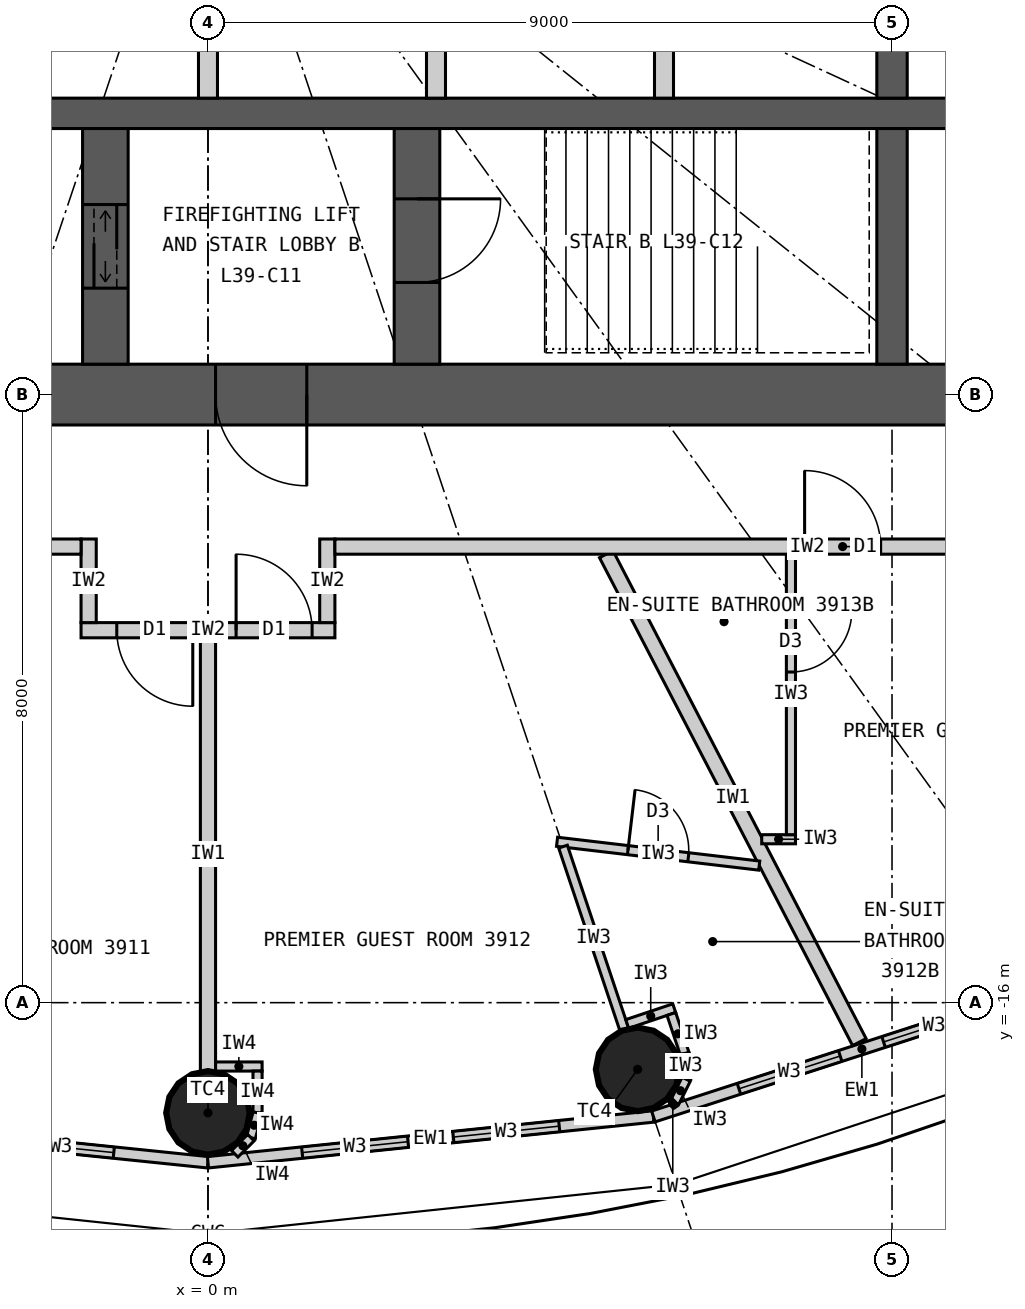
"""IFC4 building model, lengths in metres.
Left out: names, types, materials, properties, quantities, classifications, styles, units other than length and angle.
Written with IfcOpenShell. Run it as: python <this file> out.ifc"""

import sys

from ifc_helpers import new_model, si_unit, direction, frame, frame_2d, origin, origin_2d, place, context, subcontext, project, spatial, rectangle, circle, extrude, element, fill, save


model = new_model("IFC4")
c1 = context("Model", 3, precision=1e-05, world=origin(), true_north=direction((0.0, 1.0)))
c2 = subcontext(c1, "Body", "Model", "MODEL_VIEW")
j1 = project(units=[si_unit("LENGTHUNIT", "METRE"), si_unit("PLANEANGLEUNIT", "RADIAN")], contexts=[c1])
p1 = place(None, origin())
s1 = spatial("IfcSite", under=j1, at=p1, CompositionType="ELEMENT")
p2 = place(p1, origin())
s2 = spatial("IfcBuilding", under=s1, at=p2, CompositionType="ELEMENT")
p3 = place(p2, frame((0.0, 0.0, 150.0)))
s3 = spatial("IfcBuildingStorey", under=s2, at=p3, CompositionType="ELEMENT", Elevation=150.0)
for number, where, z_axis, x_axis in (
    (1, (0.0, -17.45, 0.0), (0.0, 0.0, 1.0), (1.0, 0.0, 0.0)),
    (2, (5.653, -16.877, 0.0), (0.0, 0.0, 1.0), (1.0, 0.0, 0.0)),
):
    element("IfcColumn", number, at=place(p3, frame(where, z_axis=z_axis, x_axis=x_axis)), inside=s3, PredefinedType="COLUMN", context=c2, shape_type="SweptSolid", body=[
        extrude(circle(Radius=0.55, at=origin_2d()), origin(), (0.0, 0.0, 1.0), 3.3),
    ])
p4 = place(p3, frame((12.4, -8.0, 0.0), z_axis=(0.0, 0.0, 1.0), x_axis=(-1.0, 0.0, 0.0)))
e3 = element("IfcWall", 3, at=p4, inside=s3, PredefinedType="SHEAR", context=c2, shape_type="SweptSolid", body=[
    extrude(rectangle(XDim=24.8, YDim=0.8, at=frame_2d((12.4, 0.0))), origin(), (0.0, 0.0, 1.0), 3.3),
])
p5 = place(p4, frame((11.1, 0.0, 0.0)))
e4 = element("IfcOpeningElement", 4, at=p5, cuts=e3, PredefinedType="OPENING", context=c2, shape_type="SweptSolid", body=[
    extrude(rectangle(XDim=1.2, YDim=2.2, at=frame_2d((0.6, 1.1))), frame((0.0, 0.41, 0.0), z_axis=(0.0, -1.0, 0.0), x_axis=(1.0, 0.0, 0.0)), (0.0, 0.0, 1.0), 0.82),
])
p6 = place(p4, frame((18.7, 0.0, 0.0)))
e5 = element("IfcOpeningElement", 5, at=p6, cuts=e3, PredefinedType="OPENING", context=c2, shape_type="SweptSolid", body=[
    extrude(rectangle(XDim=0.9, YDim=2.2, at=frame_2d((0.45, 1.1))), frame((0.0, 0.41, 0.0), z_axis=(0.0, -1.0, 0.0), x_axis=(1.0, 0.0, 0.0)), (0.0, 0.0, 1.0), 0.82),
])
p7 = place(p3, frame((-11.6, -4.3, 0.0), z_axis=(0.0, 0.0, 1.0), x_axis=(1.0, 0.0, 0.0)))
e6 = element("IfcWall", 6, at=p7, inside=s3, PredefinedType="SHEAR", context=c2, shape_type="SweptSolid", body=[
    extrude(rectangle(XDim=23.2, YDim=0.4, at=frame_2d((11.6, 0.0))), origin(), (0.0, 0.0, 1.0), 3.3),
])
p8 = place(p3, frame((9.0, -4.1, 0.0), z_axis=(0.0, 0.0, 1.0), x_axis=(0.0, 1.0, 0.0)))
e7 = element("IfcWall", 7, at=p8, inside=s3, PredefinedType="SHEAR", context=c2, shape_type="SweptSolid", body=[
    extrude(rectangle(XDim=2.35, YDim=0.4, at=frame_2d((1.175, 0.0))), origin(), (0.0, 0.0, 1.0), 3.3),
])
p9 = place(p3, frame((9.0, -7.6, 0.0), z_axis=(0.0, 0.0, 1.0), x_axis=(0.0, 1.0, 0.0)))
e8 = element("IfcWall", 8, at=p9, inside=s3, PredefinedType="SHEAR", context=c2, shape_type="SweptSolid", body=[
    extrude(rectangle(XDim=3.1, YDim=0.4, at=frame_2d((1.55, 0.0))), origin(), (0.0, 0.0, 1.0), 3.3),
])
p10 = place(p3, frame((2.75, -7.6, 0.0), z_axis=(0.0, 0.0, 1.0), x_axis=(0.0, 1.0, 0.0)))
e9 = element("IfcWall", 9, at=p10, inside=s3, PredefinedType="SHEAR", context=c2, shape_type="SweptSolid", body=[
    extrude(rectangle(XDim=3.1, YDim=0.6, at=frame_2d((1.55, 0.0))), origin(), (0.0, 0.0, 1.0), 3.3),
])
p11 = place(p10, frame((1.075, 0.0, 0.0)))
e10 = element("IfcOpeningElement", 10, at=p11, cuts=e9, PredefinedType="OPENING", context=c2, shape_type="SweptSolid", body=[
    extrude(rectangle(XDim=1.1, YDim=2.2, at=frame_2d((0.55, 1.1))), frame((0.0, 0.31, 0.0), z_axis=(0.0, -1.0, 0.0), x_axis=(1.0, 0.0, 0.0)), (0.0, 0.0, 1.0), 0.62),
])
p12 = place(p3, frame((-1.35, -7.6, 0.0), z_axis=(0.0, 0.0, 1.0), x_axis=(0.0, 1.0, 0.0)))
e11 = element("IfcWall", 11, at=p12, inside=s3, PredefinedType="SHEAR", context=c2, shape_type="SweptSolid", body=[
    extrude(rectangle(XDim=3.1, YDim=0.6, at=frame_2d((1.55, 0.0))), origin(), (0.0, 0.0, 1.0), 3.3),
])
p13 = place(p12, frame((1.0, 0.0, 0.0)))
e12 = element("IfcOpeningElement", 12, at=p13, cuts=e11, PredefinedType="OPENING", context=c2, shape_type="SweptSolid", body=[
    extrude(rectangle(XDim=1.1, YDim=2.2, at=frame_2d((0.55, 1.1))), frame((0.0, 0.31, 0.0), z_axis=(0.0, -1.0, 0.0), x_axis=(1.0, 0.0, 0.0)), (0.0, 0.0, 1.0), 0.62),
])
for number, where, z_axis, x_axis in (
    (13, (0.0, -4.1, 0.0), (0.0, 0.0, 1.0), (0.0, 1.0, 0.0)),
    (14, (3.0, -4.1, 0.0), (0.0, 0.0, 1.0), (0.0, 1.0, 0.0)),
    (15, (6.0, -4.1, 0.0), (0.0, 0.0, 1.0), (0.0, 1.0, 0.0)),
):
    element("IfcWall", number, at=place(p3, frame(where, z_axis=z_axis, x_axis=x_axis)), inside=s3, PredefinedType="PARTITIONING", context=c2, shape_type="SweptSolid", body=[
        extrude(rectangle(XDim=2.35, YDim=0.25, at=frame_2d((1.175, 0.0))), origin(), (0.0, 0.0, 1.0), 3.3),
    ])
p14 = place(p3, frame((-5.86, -17.497, 0.0), z_axis=(0.0, 0.0, 1.0), x_axis=(0.994751738032, -0.102318032045, 0.0)))
e16 = element("IfcWall", 16, at=p14, inside=s3, PredefinedType="ELEMENTEDWALL", context=c2, shape_type="SweptSolid", body=[
    extrude(rectangle(XDim=5.891, YDim=0.15, at=frame_2d((2.946, 0.0))), origin(), (0.0, 0.0, 1.0), 3.12),
])
p15 = place(p14, frame((1.246, 0.0, 0.9)))
e17 = element("IfcOpeningElement", 17, at=p15, cuts=e16, PredefinedType="OPENING", context=c2, shape_type="SweptSolid", body=[
    extrude(rectangle(XDim=1.4, YDim=1.9, at=frame_2d((0.7, 0.95))), frame((0.0, 0.085, 0.0), z_axis=(0.0, -1.0, 0.0), x_axis=(1.0, 0.0, 0.0)), (0.0, 0.0, 1.0), 0.17),
])
p16 = place(p14, frame((3.246, 0.0, 0.9)))
e18 = element("IfcOpeningElement", 18, at=p16, cuts=e16, PredefinedType="OPENING", context=c2, shape_type="SweptSolid", body=[
    extrude(rectangle(XDim=1.4, YDim=1.9, at=frame_2d((0.7, 0.95))), frame((0.0, 0.085, 0.0), z_axis=(0.0, -1.0, 0.0), x_axis=(1.0, 0.0, 0.0)), (0.0, 0.0, 1.0), 0.17),
])
p17 = place(p3, frame((0.0, -18.1, 0.0), z_axis=(0.0, 0.0, 1.0), x_axis=(0.994751738032, 0.102318032045, 0.0)))
e19 = element("IfcWall", 19, at=p17, inside=s3, PredefinedType="ELEMENTEDWALL", context=c2, shape_type="SweptSolid", body=[
    extrude(rectangle(XDim=5.891, YDim=0.15, at=frame_2d((2.946, 0.0))), origin(), (0.0, 0.0, 1.0), 3.12),
])
p18 = place(p17, frame((1.246, 0.0, 0.9)))
e20 = element("IfcOpeningElement", 20, at=p18, cuts=e19, PredefinedType="OPENING", context=c2, shape_type="SweptSolid", body=[
    extrude(rectangle(XDim=1.4, YDim=1.9, at=frame_2d((0.7, 0.95))), frame((0.0, 0.085, 0.0), z_axis=(0.0, -1.0, 0.0), x_axis=(1.0, 0.0, 0.0)), (0.0, 0.0, 1.0), 0.17),
])
p19 = place(p17, frame((3.246, 0.0, 0.9)))
e21 = element("IfcOpeningElement", 21, at=p19, cuts=e19, PredefinedType="OPENING", context=c2, shape_type="SweptSolid", body=[
    extrude(rectangle(XDim=1.4, YDim=1.9, at=frame_2d((0.7, 0.95))), frame((0.0, 0.085, 0.0), z_axis=(0.0, -1.0, 0.0), x_axis=(1.0, 0.0, 0.0)), (0.0, 0.0, 1.0), 0.17),
])
p20 = place(p3, frame((5.86, -17.497, 0.0), z_axis=(0.0, 0.0, 1.0), x_axis=(0.951432482129, 0.307857486429, 0.0)))
e22 = element("IfcWall", 22, at=p20, inside=s3, PredefinedType="ELEMENTEDWALL", context=c2, shape_type="SweptSolid", body=[
    extrude(rectangle(XDim=5.766, YDim=0.15, at=frame_2d((2.883, 0.0))), origin(), (0.0, 0.0, 1.0), 3.12),
])
p21 = place(p20, frame((1.183, 0.0, 0.9)))
e23 = element("IfcOpeningElement", 23, at=p21, cuts=e22, PredefinedType="OPENING", context=c2, shape_type="SweptSolid", body=[
    extrude(rectangle(XDim=1.4, YDim=1.9, at=frame_2d((0.7, 0.95))), frame((0.0, 0.085, 0.0), z_axis=(0.0, -1.0, 0.0), x_axis=(1.0, 0.0, 0.0)), (0.0, 0.0, 1.0), 0.17),
])
p22 = place(p20, frame((3.183, 0.0, 0.9)))
e24 = element("IfcOpeningElement", 24, at=p22, cuts=e22, PredefinedType="OPENING", context=c2, shape_type="SweptSolid", body=[
    extrude(rectangle(XDim=1.4, YDim=1.9, at=frame_2d((0.7, 0.95))), frame((0.0, 0.085, 0.0), z_axis=(0.0, -1.0, 0.0), x_axis=(1.0, 0.0, 0.0)), (0.0, 0.0, 1.0), 0.17),
])
p23 = place(p3, frame((0.0, -11.2, 0.0), z_axis=(0.0, 0.0, 1.0), x_axis=(0.0, -1.0, 0.0)))
e25 = element("IfcWall", 25, at=p23, inside=s3, PredefinedType="PARTITIONING", context=c2, shape_type="SweptSolid", body=[
    extrude(rectangle(XDim=5.7, YDim=0.2, at=frame_2d((2.85, 0.0))), origin(), (0.0, 0.0, 1.0), 2.42),
])
p24 = place(p3, frame((5.24, -10.1, 0.0), z_axis=(0.0, 0.0, 1.0), x_axis=(0.460532965373, -0.887642601391, 0.0)))
e26 = element("IfcWall", 26, at=p24, inside=s3, PredefinedType="PARTITIONING", context=c2, shape_type="SweptSolid", body=[
    extrude(rectangle(XDim=7.231, YDim=0.2, at=frame_2d((3.616, 0.0))), origin(), (0.0, 0.0, 1.0), 3.12),
])
p25 = place(p3, frame((1.67, -11.1, 0.0), z_axis=(0.0, 0.0, 1.0), x_axis=(-1.0, 0.0, 0.0)))
e27 = element("IfcWall", 27, at=p25, inside=s3, PredefinedType="PARTITIONING", context=c2, shape_type="SweptSolid", body=[
    extrude(rectangle(XDim=3.34, YDim=0.2, at=frame_2d((1.67, 0.0))), origin(), (0.0, 0.0, 1.0), 3.12),
])
p26 = place(p25, frame((1.87, 0.0, 0.0)))
e28 = element("IfcOpeningElement", 28, at=p26, cuts=e27, PredefinedType="OPENING", context=c2, shape_type="SweptSolid", body=[
    extrude(rectangle(XDim=1.0, YDim=2.2, at=frame_2d((0.5, 1.1))), frame((0.0, 0.11, 0.0), z_axis=(0.0, -1.0, 0.0), x_axis=(1.0, 0.0, 0.0)), (0.0, 0.0, 1.0), 0.22),
])
p27 = place(p25, frame((0.3, 0.0, 0.0)))
e29 = element("IfcOpeningElement", 29, at=p27, cuts=e27, PredefinedType="OPENING", context=c2, shape_type="SweptSolid", body=[
    extrude(rectangle(XDim=1.0, YDim=2.2, at=frame_2d((0.5, 1.1))), frame((0.0, 0.11, 0.0), z_axis=(0.0, -1.0, 0.0), x_axis=(1.0, 0.0, 0.0)), (0.0, 0.0, 1.0), 0.22),
])
for number, where, z_axis, x_axis in (
    (30, (1.57, -9.9, 0.0), (0.0, 0.0, 1.0), (0.0, -1.0, 0.0)),
    (31, (-1.57, -9.9, 0.0), (0.0, 0.0, 1.0), (0.0, -1.0, 0.0)),
):
    element("IfcWall", number, at=place(p3, frame(where, z_axis=z_axis, x_axis=x_axis)), inside=s3, PredefinedType="PARTITIONING", context=c2, shape_type="SweptSolid", body=[
        extrude(rectangle(XDim=1.1, YDim=0.2, at=frame_2d((0.55, 0.0))), origin(), (0.0, 0.0, 1.0), 3.12),
    ])
p28 = place(p3, frame((7.253, -14.197, 0.0), z_axis=(0.0, 0.0, 1.0), x_axis=(-0.993128188393, 0.117031625725, 0.0)))
e32 = element("IfcWall", 32, at=p28, inside=s3, PredefinedType="PARTITIONING", context=c2, shape_type="SweptSolid", body=[
    extrude(rectangle(XDim=2.678, YDim=0.12, at=frame_2d((1.339, 0.0))), origin(), (0.0, 0.0, 1.0), 3.12),
])
p29 = place(p28, frame((0.939, 0.0, 0.0)))
e33 = element("IfcOpeningElement", 33, at=p29, cuts=e32, PredefinedType="OPENING", context=c2, shape_type="SweptSolid", body=[
    extrude(rectangle(XDim=0.8, YDim=2.1, at=frame_2d((0.4, 1.05))), frame((0.0, 0.07, 0.0), z_axis=(0.0, -1.0, 0.0), x_axis=(1.0, 0.0, 0.0)), (0.0, 0.0, 1.0), 0.14),
])
p30 = place(p3, frame((4.671, -13.948, 0.0), z_axis=(0.0, 0.0, 1.0), x_axis=(0.317669167093, -0.948201613729, 0.0)))
e34 = element("IfcWall", 34, at=p30, inside=s3, PredefinedType="PARTITIONING", context=c2, shape_type="SweptSolid", body=[
    extrude(rectangle(XDim=2.54, YDim=0.12, at=frame_2d((1.27, 0.0))), origin(), (0.0, 0.0, 1.0), 2.42),
])
p31 = place(p3, frame((5.516, -16.28, 0.0), z_axis=(0.0, 0.0, 1.0), x_axis=(0.948157944392, 0.317799484717, 0.0)))
e35 = element("IfcWall", 35, at=p31, inside=s3, PredefinedType="PARTITIONING", context=c2, shape_type="SweptSolid", body=[
    extrude(rectangle(XDim=0.652, YDim=0.12, at=frame_2d((0.326, 0.0))), origin(), (0.0, 0.0, 1.0), 3.12),
])
p32 = place(p3, frame((6.097, -16.149, 0.0), z_axis=(0.0, 0.0, 1.0), x_axis=(0.317292604854, -0.948327687514, 0.0)))
e36 = element("IfcWall", 36, at=p32, inside=s3, PredefinedType="PARTITIONING", context=c2, shape_type="SweptSolid", body=[
    extrude(rectangle(XDim=0.55, YDim=0.12, at=frame_2d((0.275, 0.0))), origin(), (0.0, 0.0, 1.0), 3.12),
])
for number, where, z_axis, x_axis in (
    (37, (6.271, -16.67, 0.0), (0.0, 0.0, 1.0), (0.061, -0.998, 0.0)),
    (38, (6.292, -17.007, 0.0), (0.0, 0.0, 1.0), (-0.445, -0.895, 0.0)),
):
    element("IfcWall", number, at=place(p3, frame(where, z_axis=z_axis, x_axis=x_axis)), inside=s3, PredefinedType="PARTITIONING", context=c2, shape_type="SweptSolid", body=[
        extrude(rectangle(XDim=0.338, YDim=0.12, at=frame_2d((0.169, 0.0))), origin(), (0.0, 0.0, 1.0), 3.12),
    ])
p33 = place(p3, frame((6.142, -17.31, 0.0), z_axis=(0.0, 0.0, 1.0), x_axis=(-0.835039693181, -0.550189704386, 0.0)))
e39 = element("IfcWall", 39, at=p33, inside=s3, PredefinedType="PARTITIONING", context=c2, shape_type="SweptSolid", body=[
    extrude(rectangle(XDim=0.062, YDim=0.12, at=frame_2d((0.031, 0.0))), origin(), (0.0, 0.0, 1.0), 3.12),
])
p34 = place(p3, frame((7.286, -13.85, 0.0), z_axis=(0.0, 0.0, 1.0), x_axis=(1.0, 0.0, 0.0)))
e40 = element("IfcWall", 40, at=p34, inside=s3, PredefinedType="PARTITIONING", context=c2, shape_type="SweptSolid", body=[
    extrude(rectangle(XDim=0.444, YDim=0.12, at=frame_2d((0.222, 0.0))), origin(), (0.0, 0.0, 1.0), 3.12),
])
p35 = place(p3, frame((7.67, -10.1, 0.0), z_axis=(0.0, 0.0, 1.0), x_axis=(0.0, -1.0, 0.0)))
e41 = element("IfcWall", 41, at=p35, inside=s3, PredefinedType="PARTITIONING", context=c2, shape_type="SweptSolid", body=[
    extrude(rectangle(XDim=3.69, YDim=0.12, at=frame_2d((1.845, 0.0))), origin(), (0.0, 0.0, 1.0), 3.12),
])
p36 = place(p35, frame((0.75, 0.0, 0.0)))
e42 = element("IfcOpeningElement", 42, at=p36, cuts=e41, PredefinedType="OPENING", context=c2, shape_type="SweptSolid", body=[
    extrude(rectangle(XDim=0.8, YDim=2.1, at=frame_2d((0.4, 1.05))), frame((0.0, 0.07, 0.0), z_axis=(0.0, -1.0, 0.0), x_axis=(1.0, 0.0, 0.0)), (0.0, 0.0, 1.0), 0.14),
])
p37 = place(p3, frame((14.1, -10.0, 0.0), z_axis=(0.0, 0.0, 1.0), x_axis=(-1.0, 0.0, 0.0)))
e43 = element("IfcWall", 43, at=p37, inside=s3, PredefinedType="PARTITIONING", context=c2, shape_type="SweptSolid", body=[
    extrude(rectangle(XDim=12.43, YDim=0.2, at=frame_2d((6.215, 0.0))), origin(), (0.0, 0.0, 1.0), 3.12),
])
p38 = place(p37, frame((5.25, 0.0, 0.0)))
e44 = element("IfcOpeningElement", 44, at=p38, cuts=e43, PredefinedType="OPENING", context=c2, shape_type="SweptSolid", body=[
    extrude(rectangle(XDim=1.0, YDim=2.2, at=frame_2d((0.5, 1.1))), frame((0.0, 0.11, 0.0), z_axis=(0.0, -1.0, 0.0), x_axis=(1.0, 0.0, 0.0)), (0.0, 0.0, 1.0), 0.22),
])
p39 = place(p3, frame((-1.67, -10.0, 0.0), z_axis=(0.0, 0.0, 1.0), x_axis=(-1.0, 0.0, 0.0)))
e45 = element("IfcWall", 45, at=p39, inside=s3, PredefinedType="PARTITIONING", context=c2, shape_type="SweptSolid", body=[
    extrude(rectangle(XDim=12.43, YDim=0.2, at=frame_2d((6.215, 0.0))), origin(), (0.0, 0.0, 1.0), 3.12),
])
p40 = place(p39, frame((9.655, 0.0, 0.0)))
e46 = element("IfcOpeningElement", 46, at=p40, cuts=e45, PredefinedType="OPENING", context=c2, shape_type="SweptSolid", body=[
    extrude(rectangle(XDim=1.0, YDim=2.2, at=frame_2d((0.5, 1.1))), frame((0.0, 0.11, 0.0), z_axis=(0.0, -1.0, 0.0), x_axis=(1.0, 0.0, 0.0)), (0.0, 0.0, 1.0), 0.22),
])
p41 = place(p3, frame((0.1, -16.84, 0.0), z_axis=(0.0, 0.0, 1.0), x_axis=(1.0, 0.0, 0.0)))
e47 = element("IfcWall", 47, at=p41, inside=s3, PredefinedType="PARTITIONING", context=c2, shape_type="SweptSolid", body=[
    extrude(rectangle(XDim=0.612, YDim=0.12, at=frame_2d((0.306, 0.0))), origin(), (0.0, 0.0, 1.0), 3.12),
])
p42 = place(p3, frame((0.652, -16.9, 0.0), z_axis=(0.0, 0.0, 1.0), x_axis=(0.0, -1.0, 0.0)))
e48 = element("IfcWall", 48, at=p42, inside=s3, PredefinedType="PARTITIONING", context=c2, shape_type="SweptSolid", body=[
    extrude(rectangle(XDim=0.55, YDim=0.12, at=frame_2d((0.275, 0.0))), origin(), (0.0, 0.0, 1.0), 3.12),
])
p43 = place(p3, frame((0.652, -17.45, 0.0), z_axis=(0.0, 0.0, 1.0), x_axis=(-0.258832454679, -0.965922233104, 0.0)))
e49 = element("IfcWall", 49, at=p43, inside=s3, PredefinedType="PARTITIONING", context=c2, shape_type="SweptSolid", body=[
    extrude(rectangle(XDim=0.338, YDim=0.12, at=frame_2d((0.169, 0.0))), origin(), (0.0, 0.0, 1.0), 3.12),
])
p44 = place(p3, frame((0.565, -17.776, 0.0), z_axis=(0.0, 0.0, 1.0), x_axis=(-0.707106781187, -0.707106781187, 0.0)))
e50 = element("IfcWall", 50, at=p44, inside=s3, PredefinedType="PARTITIONING", context=c2, shape_type="SweptSolid", body=[
    extrude(rectangle(XDim=0.301, YDim=0.12, at=frame_2d((0.15, 0.0))), origin(), (0.0, 0.0, 1.0), 3.12),
])
p45 = place(p16, origin())
e51 = element("IfcWindow", 51, at=p45, inside=s3, PartitioningType="SINGLE_PANEL", PredefinedType="WINDOW", context=c2, shape_type="SweptSolid", body=[
    extrude(rectangle(XDim=1.4, YDim=1.9, at=frame_2d((0.7, 0.95))), frame((0.0, 0.03, 0.0), z_axis=(0.0, -1.0, 0.0), x_axis=(1.0, 0.0, 0.0)), (0.0, 0.0, 1.0), 0.06),
])
fill(e18, e51)
p46 = place(p18, origin())
e52 = element("IfcWindow", 52, at=p46, inside=s3, PartitioningType="SINGLE_PANEL", PredefinedType="WINDOW", context=c2, shape_type="SweptSolid", body=[
    extrude(rectangle(XDim=1.4, YDim=1.9, at=frame_2d((0.7, 0.95))), frame((0.0, 0.03, 0.0), z_axis=(0.0, -1.0, 0.0), x_axis=(1.0, 0.0, 0.0)), (0.0, 0.0, 1.0), 0.06),
])
fill(e20, e52)
p47 = place(p19, origin())
e53 = element("IfcWindow", 53, at=p47, inside=s3, PartitioningType="SINGLE_PANEL", PredefinedType="WINDOW", context=c2, shape_type="SweptSolid", body=[
    extrude(rectangle(XDim=1.4, YDim=1.9, at=frame_2d((0.7, 0.95))), frame((0.0, 0.03, 0.0), z_axis=(0.0, -1.0, 0.0), x_axis=(1.0, 0.0, 0.0)), (0.0, 0.0, 1.0), 0.06),
])
fill(e21, e53)
p48 = place(p21, origin())
e54 = element("IfcWindow", 54, at=p48, inside=s3, PartitioningType="SINGLE_PANEL", PredefinedType="WINDOW", context=c2, shape_type="SweptSolid", body=[
    extrude(rectangle(XDim=1.4, YDim=1.9, at=frame_2d((0.7, 0.95))), frame((0.0, 0.03, 0.0), z_axis=(0.0, -1.0, 0.0), x_axis=(1.0, 0.0, 0.0)), (0.0, 0.0, 1.0), 0.06),
])
fill(e23, e54)
p49 = place(p22, origin())
e55 = element("IfcWindow", 55, at=p49, inside=s3, PartitioningType="SINGLE_PANEL", PredefinedType="WINDOW", context=c2, shape_type="SweptSolid", body=[
    extrude(rectangle(XDim=1.4, YDim=1.9, at=frame_2d((0.7, 0.95))), frame((0.0, 0.03, 0.0), z_axis=(0.0, -1.0, 0.0), x_axis=(1.0, 0.0, 0.0)), (0.0, 0.0, 1.0), 0.06),
])
fill(e24, e55)
p50 = place(p26, origin())
e56 = element("IfcDoor", 56, at=p50, inside=s3, OperationType="SINGLE_SWING_LEFT", PredefinedType="DOOR", context=c2, shape_type="SweptSolid", body=[
    extrude(rectangle(XDim=1.0, YDim=2.2, at=frame_2d((0.5, 1.1))), frame((0.0, 0.025, 0.0), z_axis=(0.0, -1.0, 0.0), x_axis=(1.0, 0.0, 0.0)), (0.0, 0.0, 1.0), 0.05),
])
fill(e28, e56)
p51 = place(p29, origin())
e57 = element("IfcDoor", 57, at=p51, inside=s3, OperationType="SINGLE_SWING_RIGHT", PredefinedType="DOOR", context=c2, shape_type="SweptSolid", body=[
    extrude(rectangle(XDim=0.8, YDim=2.1, at=frame_2d((0.4, 1.05))), frame((0.0, 0.025, 0.0), z_axis=(0.0, -1.0, 0.0), x_axis=(1.0, 0.0, 0.0)), (0.0, 0.0, 1.0), 0.05),
])
fill(e33, e57)
p52 = place(p27, origin())
e58 = element("IfcDoor", 58, at=p52, inside=s3, OperationType="SINGLE_SWING_RIGHT", PredefinedType="DOOR", context=c2, shape_type="SweptSolid", body=[
    extrude(rectangle(XDim=1.0, YDim=2.2, at=frame_2d((0.5, 1.1))), frame((0.0, 0.025, 0.0), z_axis=(0.0, -1.0, 0.0), x_axis=(1.0, 0.0, 0.0)), (0.0, 0.0, 1.0), 0.05),
])
fill(e29, e58)
p53 = place(p36, origin())
e59 = element("IfcDoor", 59, at=p53, inside=s3, OperationType="SINGLE_SWING_LEFT", PredefinedType="DOOR", context=c2, shape_type="SweptSolid", body=[
    extrude(rectangle(XDim=0.8, YDim=2.1, at=frame_2d((0.4, 1.05))), frame((0.0, 0.025, 0.0), z_axis=(0.0, -1.0, 0.0), x_axis=(1.0, 0.0, 0.0)), (0.0, 0.0, 1.0), 0.05),
])
fill(e42, e59)
p54 = place(p38, origin())
e60 = element("IfcDoor", 60, at=p54, inside=s3, OperationType="SINGLE_SWING_RIGHT", PredefinedType="DOOR", context=c2, shape_type="SweptSolid", body=[
    extrude(rectangle(XDim=1.0, YDim=2.2, at=frame_2d((0.5, 1.1))), frame((0.0, 0.025, 0.0), z_axis=(0.0, -1.0, 0.0), x_axis=(1.0, 0.0, 0.0)), (0.0, 0.0, 1.0), 0.05),
])
fill(e44, e60)
p55 = place(p5, origin())
e61 = element("IfcDoor", 61, at=p55, inside=s3, OperationType="SINGLE_SWING_LEFT", PredefinedType="DOOR", context=c2, shape_type="SweptSolid", body=[
    extrude(rectangle(XDim=1.2, YDim=2.2, at=frame_2d((0.6, 1.1))), frame((0.0, 0.025, 0.0), z_axis=(0.0, -1.0, 0.0), x_axis=(1.0, 0.0, 0.0)), (0.0, 0.0, 1.0), 0.05),
])
fill(e4, e61)
p56 = place(p11, origin())
e62 = element("IfcDoor", 62, at=p56, inside=s3, OperationType="SINGLE_SWING_RIGHT", PredefinedType="DOOR", context=c2, shape_type="SweptSolid", body=[
    extrude(rectangle(XDim=1.1, YDim=2.2, at=frame_2d((0.55, 1.1))), frame((0.0, 0.025, 0.0), z_axis=(0.0, -1.0, 0.0), x_axis=(1.0, 0.0, 0.0)), (0.0, 0.0, 1.0), 0.05),
])
fill(e10, e62)
p57 = place(p13, origin())
e63 = element("IfcDoor", 63, at=p57, inside=s3, OperationType="DOUBLE_DOOR_SLIDING", PredefinedType="DOOR", context=c2, shape_type="SweptSolid", body=[
    extrude(rectangle(XDim=1.1, YDim=2.2, at=frame_2d((0.55, 1.1))), frame((0.0, 0.025, 0.0), z_axis=(0.0, -1.0, 0.0), x_axis=(1.0, 0.0, 0.0)), (0.0, 0.0, 1.0), 0.05),
])
fill(e12, e63)
save(model, sys.argv[1])
